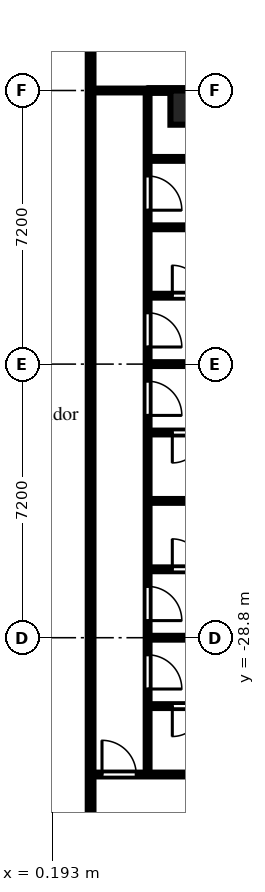
"""IFC4 building model, lengths in metres.
Left out: names, types, materials, properties, quantities, classifications, styles, units other than length and angle.
Written with IfcOpenShell. Run it as: python <this file> out.ifc"""

import sys

from ifc_helpers import new_model, si_unit, direction, frame, frame_2d, origin, origin_2d, place, context, subcontext, project, spatial, rectangle, extrude, element, fill, save


model = new_model("IFC4")
c1 = context("Model", 3, precision=1e-05, world=origin(), true_north=direction((0.0, 1.0)))
c2 = subcontext(c1, "Body", "Model", "MODEL_VIEW")
j1 = project(units=[si_unit("LENGTHUNIT", "METRE"), si_unit("PLANEANGLEUNIT", "RADIAN")], contexts=[c1])
p1 = place(None, origin())
s1 = spatial("IfcSite", under=j1, at=p1, CompositionType="ELEMENT")
p2 = place(p1, origin())
s2 = spatial("IfcBuilding", under=s1, at=p2, CompositionType="ELEMENT")
p3 = place(p2, frame((0.0, 0.0, 93.9)))
s3 = spatial("IfcBuildingStorey", under=s2, at=p3, CompositionType="ELEMENT", Elevation=93.9)
p4 = place(p3, frame((3.75, -14.85, 0.0), z_axis=(0.0, 0.0, 1.0), x_axis=(1.0, 0.0, 0.0)))
e1 = element("IfcColumn", 1, at=p4, inside=s3, PredefinedType="COLUMN", context=c2, shape_type="SweptSolid", body=[
    extrude(rectangle(XDim=0.9, YDim=0.9, at=origin_2d()), origin(), (0.0, 0.0, 1.0), 3.0),
])
p5 = place(p3, frame((1.2, -36.5, 0.0), z_axis=(0.0, 0.0, 1.0), x_axis=(0.0, 1.0, 0.0)))
e2 = element("IfcWall", 2, at=p5, inside=s3, PredefinedType="PARTITIONING", context=c2, shape_type="SweptSolid", body=[
    extrude(rectangle(XDim=35.375, YDim=0.15, at=frame_2d((17.688, 0.0))), origin(), (0.0, 0.0, 1.0), 2.575),
])
p6 = place(p5, frame((33.65, 0.0, 0.0)))
e3 = element("IfcOpeningElement", 3, at=p6, cuts=e2, PredefinedType="OPENING", context=c2, shape_type="SweptSolid", body=[
    extrude(rectangle(XDim=0.9, YDim=2.1, at=frame_2d((0.45, 1.05))), frame((0.0, 0.085, 0.0), z_axis=(0.0, -1.0, 0.0), x_axis=(1.0, 0.0, 0.0)), (0.0, 0.0, 1.0), 0.17),
])
p7 = place(p5, frame((30.65, 0.0, 0.0)))
e4 = element("IfcOpeningElement", 4, at=p7, cuts=e2, PredefinedType="OPENING", context=c2, shape_type="SweptSolid", body=[
    extrude(rectangle(XDim=0.9, YDim=2.1, at=frame_2d((0.45, 1.05))), frame((0.0, 0.085, 0.0), z_axis=(0.0, -1.0, 0.0), x_axis=(1.0, 0.0, 0.0)), (0.0, 0.0, 1.0), 0.17),
])
p8 = place(p5, frame((27.45, 0.0, 0.0)))
e5 = element("IfcOpeningElement", 5, at=p8, cuts=e2, PredefinedType="OPENING", context=c2, shape_type="SweptSolid", body=[
    extrude(rectangle(XDim=0.9, YDim=2.1, at=frame_2d((0.45, 1.05))), frame((0.0, 0.085, 0.0), z_axis=(0.0, -1.0, 0.0), x_axis=(1.0, 0.0, 0.0)), (0.0, 0.0, 1.0), 0.17),
])
p9 = place(p5, frame((23.85, 0.0, 0.0)))
e6 = element("IfcOpeningElement", 6, at=p9, cuts=e2, PredefinedType="OPENING", context=c2, shape_type="SweptSolid", body=[
    extrude(rectangle(XDim=0.9, YDim=2.1, at=frame_2d((0.45, 1.05))), frame((0.0, 0.085, 0.0), z_axis=(0.0, -1.0, 0.0), x_axis=(1.0, 0.0, 0.0)), (0.0, 0.0, 1.0), 0.17),
])
p10 = place(p5, frame((1.55, 0.0, 0.0)))
e7 = element("IfcOpeningElement", 7, at=p10, cuts=e2, PredefinedType="OPENING", context=c2, shape_type="SweptSolid", body=[
    extrude(rectangle(XDim=1.0, YDim=2.1, at=frame_2d((0.5, 1.05))), frame((0.0, 0.085, 0.0), z_axis=(0.0, -1.0, 0.0), x_axis=(1.0, 0.0, 0.0)), (0.0, 0.0, 1.0), 0.17),
])
p11 = place(p3, frame((1.275, -32.4, 0.0), z_axis=(0.0, 0.0, 1.0), x_axis=(1.0, 0.0, 0.0)))
e8 = element("IfcWall", 8, at=p11, inside=s3, PredefinedType="PARTITIONING", context=c2, shape_type="SweptSolid", body=[
    extrude(rectangle(XDim=5.625, YDim=0.1, at=frame_2d((2.812, 0.0))), origin(), (0.0, 0.0, 1.0), 2.575),
])
p12 = place(p11, frame((0.225, 0.0, 0.0)))
e9 = element("IfcOpeningElement", 9, at=p12, cuts=e8, PredefinedType="OPENING", context=c2, shape_type="SweptSolid", body=[
    extrude(rectangle(XDim=0.9, YDim=2.1, at=frame_2d((0.45, 1.05))), frame((0.0, 0.06, 0.0), z_axis=(0.0, -1.0, 0.0), x_axis=(1.0, 0.0, 0.0)), (0.0, 0.0, 1.0), 0.12),
])
p13 = place(p3, frame((1.275, -14.4, 0.0), z_axis=(0.0, 0.0, 1.0), x_axis=(1.0, 0.0, 0.0)))
e10 = element("IfcWall", 10, at=p13, inside=s3, PredefinedType="PARTITIONING", context=c2, shape_type="SweptSolid", body=[
    extrude(rectangle(XDim=1.425, YDim=0.1, at=frame_2d((0.712, 0.0))), origin(), (0.0, 0.0, 1.0), 2.575),
])
p14 = place(p3, frame((2.7, -32.35, 0.0), z_axis=(0.0, 0.0, 1.0), x_axis=(0.0, 1.0, 0.0)))
e11 = element("IfcWall", 11, at=p14, inside=s3, PredefinedType="PARTITIONING", context=c2, shape_type="SweptSolid", body=[
    extrude(rectangle(XDim=17.888, YDim=0.1, at=frame_2d((8.944, 0.0))), origin(), (0.0, 0.0, 1.0), 2.575),
])
p15 = place(p14, frame((2.2, 0.0, 0.0)))
e12 = element("IfcOpeningElement", 12, at=p15, cuts=e11, PredefinedType="OPENING", context=c2, shape_type="SweptSolid", body=[
    extrude(rectangle(XDim=0.9, YDim=2.1, at=frame_2d((0.45, 1.05))), frame((0.0, 0.06, 0.0), z_axis=(0.0, -1.0, 0.0), x_axis=(1.0, 0.0, 0.0)), (0.0, 0.0, 1.0), 0.12),
])
p16 = place(p14, frame((4.0, 0.0, 0.0)))
e13 = element("IfcOpeningElement", 13, at=p16, cuts=e11, PredefinedType="OPENING", context=c2, shape_type="SweptSolid", body=[
    extrude(rectangle(XDim=0.9, YDim=2.1, at=frame_2d((0.45, 1.05))), frame((0.0, 0.06, 0.0), z_axis=(0.0, -1.0, 0.0), x_axis=(1.0, 0.0, 0.0)), (0.0, 0.0, 1.0), 0.12),
])
p17 = place(p14, frame((9.4, 0.0, 0.0)))
e14 = element("IfcOpeningElement", 14, at=p17, cuts=e11, PredefinedType="OPENING", context=c2, shape_type="SweptSolid", body=[
    extrude(rectangle(XDim=0.9, YDim=2.1, at=frame_2d((0.45, 1.05))), frame((0.0, 0.06, 0.0), z_axis=(0.0, -1.0, 0.0), x_axis=(1.0, 0.0, 0.0)), (0.0, 0.0, 1.0), 0.12),
])
p18 = place(p14, frame((11.2, 0.0, 0.0)))
e15 = element("IfcOpeningElement", 15, at=p18, cuts=e11, PredefinedType="OPENING", context=c2, shape_type="SweptSolid", body=[
    extrude(rectangle(XDim=0.9, YDim=2.1, at=frame_2d((0.45, 1.05))), frame((0.0, 0.06, 0.0), z_axis=(0.0, -1.0, 0.0), x_axis=(1.0, 0.0, 0.0)), (0.0, 0.0, 1.0), 0.12),
])
p19 = place(p14, frame((14.8, 0.0, 0.0)))
e16 = element("IfcOpeningElement", 16, at=p19, cuts=e11, PredefinedType="OPENING", context=c2, shape_type="SweptSolid", body=[
    extrude(rectangle(XDim=0.9, YDim=2.1, at=frame_2d((0.45, 1.05))), frame((0.0, 0.06, 0.0), z_axis=(0.0, -1.0, 0.0), x_axis=(1.0, 0.0, 0.0)), (0.0, 0.0, 1.0), 0.12),
])
p20 = place(p3, frame((2.75, -30.6, 0.0), z_axis=(0.0, 0.0, 1.0), x_axis=(1.0, 0.0, 0.0)))
e17 = element("IfcWall", 17, at=p20, inside=s3, PredefinedType="PARTITIONING", context=c2, shape_type="SweptSolid", body=[
    extrude(rectangle(XDim=2.1, YDim=0.1, at=frame_2d((1.05, 0.0))), origin(), (0.0, 0.0, 1.0), 2.575),
])
p21 = place(p20, frame((0.6, 0.0, 0.0)))
e18 = element("IfcOpeningElement", 18, at=p21, cuts=e17, PredefinedType="OPENING", context=c2, shape_type="SweptSolid", body=[
    extrude(rectangle(XDim=0.8, YDim=2.1, at=frame_2d((0.4, 1.05))), frame((0.0, 0.06, 0.0), z_axis=(0.0, -1.0, 0.0), x_axis=(1.0, 0.0, 0.0)), (0.0, 0.0, 1.0), 0.12),
])
p22 = place(p3, frame((2.75, -28.8, 0.0), z_axis=(0.0, 0.0, 1.0), x_axis=(1.0, 0.0, 0.0)))
e19 = element("IfcWall", 19, at=p22, inside=s3, PredefinedType="PARTITIONING", context=c2, shape_type="SweptSolid", body=[
    extrude(rectangle(XDim=4.15, YDim=0.1, at=frame_2d((2.075, 0.0))), origin(), (0.0, 0.0, 1.0), 2.575),
])
p23 = place(p3, frame((2.75, -27.0, 0.0), z_axis=(0.0, 0.0, 1.0), x_axis=(1.0, 0.0, 0.0)))
e20 = element("IfcWall", 20, at=p23, inside=s3, PredefinedType="PARTITIONING", context=c2, shape_type="SweptSolid", body=[
    extrude(rectangle(XDim=2.1, YDim=0.1, at=frame_2d((1.05, 0.0))), origin(), (0.0, 0.0, 1.0), 2.575),
])
p24 = place(p23, frame((0.6, 0.0, 0.0)))
e21 = element("IfcOpeningElement", 21, at=p24, cuts=e20, PredefinedType="OPENING", context=c2, shape_type="SweptSolid", body=[
    extrude(rectangle(XDim=0.8, YDim=2.1, at=frame_2d((0.4, 1.05))), frame((0.0, 0.06, 0.0), z_axis=(0.0, -1.0, 0.0), x_axis=(1.0, 0.0, 0.0)), (0.0, 0.0, 1.0), 0.12),
])
p25 = place(p3, frame((2.75, -25.2, 0.0), z_axis=(0.0, 0.0, 1.0), x_axis=(1.0, 0.0, 0.0)))
e22 = element("IfcWall", 22, at=p25, inside=s3, PredefinedType="PARTITIONING", context=c2, shape_type="SweptSolid", body=[
    extrude(rectangle(XDim=4.15, YDim=0.1, at=frame_2d((2.075, 0.0))), origin(), (0.0, 0.0, 1.0), 2.575),
])
p26 = place(p3, frame((2.75, -23.4, 0.0), z_axis=(0.0, 0.0, 1.0), x_axis=(1.0, 0.0, 0.0)))
e23 = element("IfcWall", 23, at=p26, inside=s3, PredefinedType="PARTITIONING", context=c2, shape_type="SweptSolid", body=[
    extrude(rectangle(XDim=2.1, YDim=0.1, at=frame_2d((1.05, 0.0))), origin(), (0.0, 0.0, 1.0), 2.575),
])
p27 = place(p26, frame((0.6, 0.0, 0.0)))
e24 = element("IfcOpeningElement", 24, at=p27, cuts=e23, PredefinedType="OPENING", context=c2, shape_type="SweptSolid", body=[
    extrude(rectangle(XDim=0.8, YDim=2.1, at=frame_2d((0.4, 1.05))), frame((0.0, 0.06, 0.0), z_axis=(0.0, -1.0, 0.0), x_axis=(1.0, 0.0, 0.0)), (0.0, 0.0, 1.0), 0.12),
])
p28 = place(p3, frame((2.75, -21.6, 0.0), z_axis=(0.0, 0.0, 1.0), x_axis=(1.0, 0.0, 0.0)))
e25 = element("IfcWall", 25, at=p28, inside=s3, PredefinedType="PARTITIONING", context=c2, shape_type="SweptSolid", body=[
    extrude(rectangle(XDim=4.15, YDim=0.1, at=frame_2d((2.075, 0.0))), origin(), (0.0, 0.0, 1.0), 2.575),
])
p29 = place(p3, frame((2.75, -19.8, 0.0), z_axis=(0.0, 0.0, 1.0), x_axis=(1.0, 0.0, 0.0)))
e26 = element("IfcWall", 26, at=p29, inside=s3, PredefinedType="PARTITIONING", context=c2, shape_type="SweptSolid", body=[
    extrude(rectangle(XDim=2.1, YDim=0.1, at=frame_2d((1.05, 0.0))), origin(), (0.0, 0.0, 1.0), 2.575),
])
p30 = place(p29, frame((0.6, 0.0, 0.0)))
e27 = element("IfcOpeningElement", 27, at=p30, cuts=e26, PredefinedType="OPENING", context=c2, shape_type="SweptSolid", body=[
    extrude(rectangle(XDim=0.8, YDim=2.1, at=frame_2d((0.4, 1.05))), frame((0.0, 0.06, 0.0), z_axis=(0.0, -1.0, 0.0), x_axis=(1.0, 0.0, 0.0)), (0.0, 0.0, 1.0), 0.12),
])
p31 = place(p3, frame((2.75, -18.0, 0.0), z_axis=(0.0, 0.0, 1.0), x_axis=(1.0, 0.0, 0.0)))
e28 = element("IfcWall", 28, at=p31, inside=s3, PredefinedType="PARTITIONING", context=c2, shape_type="SweptSolid", body=[
    extrude(rectangle(XDim=4.15, YDim=0.1, at=frame_2d((2.075, 0.0))), origin(), (0.0, 0.0, 1.0), 2.575),
])
p32 = place(p3, frame((2.75, -16.2, 0.0), z_axis=(0.0, 0.0, 1.0), x_axis=(1.0, 0.0, 0.0)))
e29 = element("IfcWall", 29, at=p32, inside=s3, PredefinedType="PARTITIONING", context=c2, shape_type="SweptSolid", body=[
    extrude(rectangle(XDim=2.1, YDim=0.1, at=frame_2d((1.05, 0.0))), origin(), (0.0, 0.0, 1.0), 2.575),
])
p33 = place(p3, frame((2.7, -14.4, 0.0), z_axis=(0.0, 0.0, 1.0), x_axis=(1.0, 0.0, 0.0)))
e30 = element("IfcWall", 30, at=p33, inside=s3, PredefinedType="PARTITIONING", context=c2, shape_type="SweptSolid", body=[
    extrude(rectangle(XDim=1.2, YDim=0.125, at=frame_2d((0.6, 0.0))), origin(), (0.0, 0.0, 1.0), 2.575),
])
p34 = place(p12, origin())
e31 = element("IfcDoor", 31, at=p34, inside=s3, OperationType="SINGLE_SWING_LEFT", PredefinedType="DOOR", context=c2, shape_type="SweptSolid", body=[
    extrude(rectangle(XDim=0.9, YDim=2.1, at=frame_2d((0.45, 1.05))), frame((0.0, 0.025, 0.0), z_axis=(0.0, -1.0, 0.0), x_axis=(1.0, 0.0, 0.0)), (0.0, 0.0, 1.0), 0.05),
])
fill(e9, e31)
p35 = place(p15, frame((0.9, 0.0, 0.0), z_axis=(0.0, 0.0, 1.0), x_axis=(-1.0, 0.0, 0.0)))
e32 = element("IfcDoor", 32, at=p35, inside=s3, OperationType="SINGLE_SWING_RIGHT", PredefinedType="DOOR", context=c2, shape_type="SweptSolid", body=[
    extrude(rectangle(XDim=0.9, YDim=2.1, at=frame_2d((0.45, 1.05))), frame((0.0, 0.025, 0.0), z_axis=(0.0, -1.0, 0.0), x_axis=(1.0, 0.0, 0.0)), (0.0, 0.0, 1.0), 0.05),
])
fill(e12, e32)
p36 = place(p16, frame((0.9, 0.0, 0.0), z_axis=(0.0, 0.0, 1.0), x_axis=(-1.0, 0.0, 0.0)))
e33 = element("IfcDoor", 33, at=p36, inside=s3, OperationType="SINGLE_SWING_RIGHT", PredefinedType="DOOR", context=c2, shape_type="SweptSolid", body=[
    extrude(rectangle(XDim=0.9, YDim=2.1, at=frame_2d((0.45, 1.05))), frame((0.0, 0.025, 0.0), z_axis=(0.0, -1.0, 0.0), x_axis=(1.0, 0.0, 0.0)), (0.0, 0.0, 1.0), 0.05),
])
fill(e13, e33)
p37 = place(p17, frame((0.9, 0.0, 0.0), z_axis=(0.0, 0.0, 1.0), x_axis=(-1.0, 0.0, 0.0)))
e34 = element("IfcDoor", 34, at=p37, inside=s3, OperationType="SINGLE_SWING_RIGHT", PredefinedType="DOOR", context=c2, shape_type="SweptSolid", body=[
    extrude(rectangle(XDim=0.9, YDim=2.1, at=frame_2d((0.45, 1.05))), frame((0.0, 0.025, 0.0), z_axis=(0.0, -1.0, 0.0), x_axis=(1.0, 0.0, 0.0)), (0.0, 0.0, 1.0), 0.05),
])
fill(e14, e34)
p38 = place(p18, frame((0.9, 0.0, 0.0), z_axis=(0.0, 0.0, 1.0), x_axis=(-1.0, 0.0, 0.0)))
e35 = element("IfcDoor", 35, at=p38, inside=s3, OperationType="SINGLE_SWING_RIGHT", PredefinedType="DOOR", context=c2, shape_type="SweptSolid", body=[
    extrude(rectangle(XDim=0.9, YDim=2.1, at=frame_2d((0.45, 1.05))), frame((0.0, 0.025, 0.0), z_axis=(0.0, -1.0, 0.0), x_axis=(1.0, 0.0, 0.0)), (0.0, 0.0, 1.0), 0.05),
])
fill(e15, e35)
p39 = place(p19, frame((0.9, 0.0, 0.0), z_axis=(0.0, 0.0, 1.0), x_axis=(-1.0, 0.0, 0.0)))
e36 = element("IfcDoor", 36, at=p39, inside=s3, OperationType="SINGLE_SWING_RIGHT", PredefinedType="DOOR", context=c2, shape_type="SweptSolid", body=[
    extrude(rectangle(XDim=0.9, YDim=2.1, at=frame_2d((0.45, 1.05))), frame((0.0, 0.025, 0.0), z_axis=(0.0, -1.0, 0.0), x_axis=(1.0, 0.0, 0.0)), (0.0, 0.0, 1.0), 0.05),
])
fill(e16, e36)
p40 = place(p30, origin())
e37 = element("IfcDoor", 37, at=p40, inside=s3, OperationType="SINGLE_SWING_LEFT", PredefinedType="DOOR", context=c2, shape_type="SweptSolid", body=[
    extrude(rectangle(XDim=0.8, YDim=2.1, at=frame_2d((0.4, 1.05))), frame((0.0, 0.025, 0.0), z_axis=(0.0, -1.0, 0.0), x_axis=(1.0, 0.0, 0.0)), (0.0, 0.0, 1.0), 0.05),
])
fill(e27, e37)
p41 = place(p27, frame((0.8, 0.0, 0.0), z_axis=(0.0, 0.0, 1.0), x_axis=(-1.0, 0.0, 0.0)))
e38 = element("IfcDoor", 38, at=p41, inside=s3, OperationType="SINGLE_SWING_RIGHT", PredefinedType="DOOR", context=c2, shape_type="SweptSolid", body=[
    extrude(rectangle(XDim=0.8, YDim=2.1, at=frame_2d((0.4, 1.05))), frame((0.0, 0.025, 0.0), z_axis=(0.0, -1.0, 0.0), x_axis=(1.0, 0.0, 0.0)), (0.0, 0.0, 1.0), 0.05),
])
fill(e24, e38)
p42 = place(p24, origin())
e39 = element("IfcDoor", 39, at=p42, inside=s3, OperationType="SINGLE_SWING_LEFT", PredefinedType="DOOR", context=c2, shape_type="SweptSolid", body=[
    extrude(rectangle(XDim=0.8, YDim=2.1, at=frame_2d((0.4, 1.05))), frame((0.0, 0.025, 0.0), z_axis=(0.0, -1.0, 0.0), x_axis=(1.0, 0.0, 0.0)), (0.0, 0.0, 1.0), 0.05),
])
fill(e21, e39)
p43 = place(p21, frame((0.8, 0.0, 0.0), z_axis=(0.0, 0.0, 1.0), x_axis=(-1.0, 0.0, 0.0)))
e40 = element("IfcDoor", 40, at=p43, inside=s3, OperationType="SINGLE_SWING_RIGHT", PredefinedType="DOOR", context=c2, shape_type="SweptSolid", body=[
    extrude(rectangle(XDim=0.8, YDim=2.1, at=frame_2d((0.4, 1.05))), frame((0.0, 0.025, 0.0), z_axis=(0.0, -1.0, 0.0), x_axis=(1.0, 0.0, 0.0)), (0.0, 0.0, 1.0), 0.05),
])
fill(e18, e40)
save(model, sys.argv[1])
